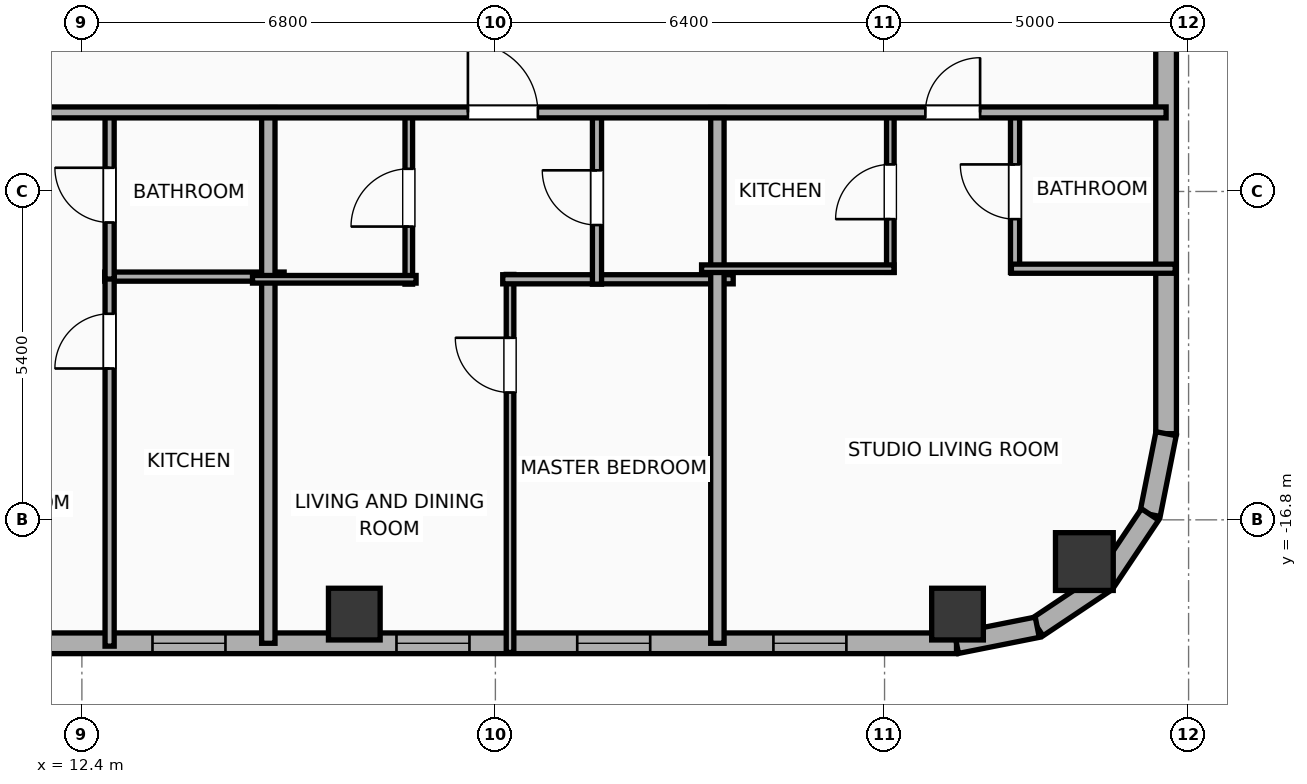
"""IFC4 building model, lengths in metres.
Left out: names, types, materials, properties, quantities, classifications, styles, units other than length and angle.
Written with IfcOpenShell. Run it as: python <this file> out.ifc"""

import sys

from ifc_helpers import new_model, si_unit, direction, frame, frame_2d, origin, origin_2d, place, context, subcontext, project, spatial, rectangle, hollow_rectangle, hollow_circle, extrude, element, fill, save


model = new_model("IFC4")
c1 = context("Model", 3, precision=1e-05, world=origin(), true_north=direction((0.0, 1.0)))
c2 = subcontext(c1, "Body", "Model", "MODEL_VIEW")
j1 = project(units=[si_unit("LENGTHUNIT", "METRE"), si_unit("PLANEANGLEUNIT", "RADIAN")], contexts=[c1])
p1 = place(None, origin())
s1 = spatial("IfcSite", under=j1, at=p1, CompositionType="ELEMENT")
p2 = place(p1, origin())
s2 = spatial("IfcBuilding", under=s1, at=p2, CompositionType="ELEMENT")
p3 = place(p2, frame((0.0, 0.0, 235.3)))
s3 = spatial("IfcBuildingStorey", under=s2, at=p3, CompositionType="ELEMENT", Elevation=235.3)
for number, where, z_axis, x_axis in (
    (1, (16.88, -18.35, 0.0), (0.0, 0.0, 1.0), (1.0, 0.0, 0.0)),
    (2, (26.8, -18.35, 0.0), (0.0, 0.0, 1.0), (1.0, 0.0, 0.0)),
):
    element("IfcColumn", number, at=place(p3, frame(where, z_axis=z_axis, x_axis=x_axis)), inside=s3, PredefinedType="COLUMN", context=c2, shape_type="SweptSolid", body=[
        extrude(hollow_rectangle(XDim=0.85, YDim=0.85, WallThickness=0.028, at=origin_2d()), origin(), (0.0, 0.0, 1.0), 3.9),
    ])
p4 = place(p3, frame((28.886, -17.486, 0.0), z_axis=(0.0, 0.0, 1.0), x_axis=(1.0, 0.0, 0.0)))
e3 = element("IfcColumn", 3, at=p4, inside=s3, PredefinedType="COLUMN", context=c2, shape_type="SweptSolid", body=[
    extrude(hollow_circle(Radius=0.475, WallThickness=0.032, at=origin_2d()), origin(), (0.0, 0.0, 1.0), 3.9),
])
p5 = place(p3, frame((26.783, -18.83, 0.0), z_axis=(0.0, 0.0, 1.0), x_axis=(-1.0, 0.0, 0.0)))
e4 = element("IfcWall", 4, at=p5, inside=s3, PredefinedType="ELEMENTEDWALL", context=c2, shape_type="SweptSolid", body=[
    extrude(rectangle(XDim=49.566, YDim=0.34, at=frame_2d((24.783, 0.0))), origin(), (0.0, 0.0, 1.0), 3.65),
])
p6 = place(p5, frame((23.583, 0.0, 0.75)))
e5 = element("IfcOpeningElement", 5, at=p6, cuts=e4, PredefinedType="OPENING", context=c2, shape_type="SweptSolid", body=[
    extrude(rectangle(XDim=2.4, YDim=2.1, at=frame_2d((1.2, 1.05))), frame((0.0, 0.18, 0.0), z_axis=(0.0, -1.0, 0.0), x_axis=(1.0, 0.0, 0.0)), (0.0, 0.0, 1.0), 0.36),
])
p7 = place(p5, frame((41.756, 0.0, 0.75)))
e6 = element("IfcOpeningElement", 6, at=p7, cuts=e4, PredefinedType="OPENING", context=c2, shape_type="SweptSolid", body=[
    extrude(rectangle(XDim=2.4, YDim=2.1, at=frame_2d((1.2, 1.05))), frame((0.0, 0.18, 0.0), z_axis=(0.0, -1.0, 0.0), x_axis=(1.0, 0.0, 0.0)), (0.0, 0.0, 1.0), 0.36),
])
p8 = place(p5, frame((47.222, 0.0, 0.75)))
e7 = element("IfcOpeningElement", 7, at=p8, cuts=e4, PredefinedType="OPENING", context=c2, shape_type="SweptSolid", body=[
    extrude(rectangle(XDim=1.2, YDim=2.05, at=frame_2d((0.6, 1.025))), frame((0.0, 0.18, 0.0), z_axis=(0.0, -1.0, 0.0), x_axis=(1.0, 0.0, 0.0)), (0.0, 0.0, 1.0), 0.36),
])
p9 = place(p5, frame((45.181, 0.0, 0.75)))
e8 = element("IfcOpeningElement", 8, at=p9, cuts=e4, PredefinedType="OPENING", context=c2, shape_type="SweptSolid", body=[
    extrude(rectangle(XDim=1.2, YDim=2.05, at=frame_2d((0.6, 1.025))), frame((0.0, 0.18, 0.0), z_axis=(0.0, -1.0, 0.0), x_axis=(1.0, 0.0, 0.0)), (0.0, 0.0, 1.0), 0.36),
])
p10 = place(p5, frame((37.289, 0.0, 0.75)))
e9 = element("IfcOpeningElement", 9, at=p10, cuts=e4, PredefinedType="OPENING", context=c2, shape_type="SweptSolid", body=[
    extrude(rectangle(XDim=1.2, YDim=2.05, at=frame_2d((0.6, 1.025))), frame((0.0, 0.18, 0.0), z_axis=(0.0, -1.0, 0.0), x_axis=(1.0, 0.0, 0.0)), (0.0, 0.0, 1.0), 0.36),
])
p11 = place(p5, frame((15.715, 0.0, 0.75)))
e10 = element("IfcOpeningElement", 10, at=p11, cuts=e4, PredefinedType="OPENING", context=c2, shape_type="SweptSolid", body=[
    extrude(rectangle(XDim=1.2, YDim=2.05, at=frame_2d((0.6, 1.025))), frame((0.0, 0.18, 0.0), z_axis=(0.0, -1.0, 0.0), x_axis=(1.0, 0.0, 0.0)), (0.0, 0.0, 1.0), 0.36),
])
p12 = place(p5, frame((12.022, 0.0, 0.75)))
e11 = element("IfcOpeningElement", 11, at=p12, cuts=e4, PredefinedType="OPENING", context=c2, shape_type="SweptSolid", body=[
    extrude(rectangle(XDim=1.2, YDim=2.05, at=frame_2d((0.6, 1.025))), frame((0.0, 0.18, 0.0), z_axis=(0.0, -1.0, 0.0), x_axis=(1.0, 0.0, 0.0)), (0.0, 0.0, 1.0), 0.36),
])
p13 = place(p5, frame((8.01, 0.0, 0.75)))
e12 = element("IfcOpeningElement", 12, at=p13, cuts=e4, PredefinedType="OPENING", context=c2, shape_type="SweptSolid", body=[
    extrude(rectangle(XDim=1.2, YDim=2.05, at=frame_2d((0.6, 1.025))), frame((0.0, 0.18, 0.0), z_axis=(0.0, -1.0, 0.0), x_axis=(1.0, 0.0, 0.0)), (0.0, 0.0, 1.0), 0.36),
])
p14 = place(p5, frame((5.037, 0.0, 0.75)))
e13 = element("IfcOpeningElement", 13, at=p14, cuts=e4, PredefinedType="OPENING", context=c2, shape_type="SweptSolid", body=[
    extrude(rectangle(XDim=1.2, YDim=2.05, at=frame_2d((0.6, 1.025))), frame((0.0, 0.18, 0.0), z_axis=(0.0, -1.0, 0.0), x_axis=(1.0, 0.0, 0.0)), (0.0, 0.0, 1.0), 0.36),
])
p15 = place(p5, frame((1.811, 0.0, 0.75)))
e14 = element("IfcOpeningElement", 14, at=p15, cuts=e4, PredefinedType="OPENING", context=c2, shape_type="SweptSolid", body=[
    extrude(rectangle(XDim=1.2, YDim=2.05, at=frame_2d((0.6, 1.025))), frame((0.0, 0.18, 0.0), z_axis=(0.0, -1.0, 0.0), x_axis=(1.0, 0.0, 0.0)), (0.0, 0.0, 1.0), 0.36),
])
p16 = place(p5, frame((32.253, 0.0, 0.75)))
e15 = element("IfcOpeningElement", 15, at=p16, cuts=e4, PredefinedType="OPENING", context=c2, shape_type="SweptSolid", body=[
    extrude(rectangle(XDim=1.2, YDim=2.05, at=frame_2d((0.6, 1.025))), frame((0.0, 0.18, 0.0), z_axis=(0.0, -1.0, 0.0), x_axis=(1.0, 0.0, 0.0)), (0.0, 0.0, 1.0), 0.36),
])
p17 = place(p5, frame((27.853, 0.0, 0.75)))
e16 = element("IfcOpeningElement", 16, at=p17, cuts=e4, PredefinedType="OPENING", context=c2, shape_type="SweptSolid", body=[
    extrude(rectangle(XDim=1.2, YDim=2.05, at=frame_2d((0.6, 1.025))), frame((0.0, 0.18, 0.0), z_axis=(0.0, -1.0, 0.0), x_axis=(1.0, 0.0, 0.0)), (0.0, 0.0, 1.0), 0.36),
])
p18 = place(p5, frame((20.473, 0.0, 0.75)))
e17 = element("IfcOpeningElement", 17, at=p18, cuts=e4, PredefinedType="OPENING", context=c2, shape_type="SweptSolid", body=[
    extrude(rectangle(XDim=1.2, YDim=2.05, at=frame_2d((0.6, 1.025))), frame((0.0, 0.18, 0.0), z_axis=(0.0, -1.0, 0.0), x_axis=(1.0, 0.0, 0.0)), (0.0, 0.0, 1.0), 0.36),
])
p19 = place(p3, frame((30.23, 16.583, 0.0), z_axis=(0.0, 0.0, 1.0), x_axis=(0.0, -1.0, 0.0)))
e18 = element("IfcWall", 18, at=p19, inside=s3, PredefinedType="ELEMENTEDWALL", context=c2, shape_type="SweptSolid", body=[
    extrude(rectangle(XDim=31.967, YDim=0.34, at=frame_2d((15.983, 0.0))), origin(), (0.0, 0.0, 1.0), 3.65),
])
p20 = place(p19, frame((11.638, 0.0, 0.75)))
e19 = element("IfcOpeningElement", 19, at=p20, cuts=e18, PredefinedType="OPENING", context=c2, shape_type="SweptSolid", body=[
    extrude(rectangle(XDim=1.2, YDim=2.05, at=frame_2d((0.6, 1.025))), frame((0.0, 0.18, 0.0), z_axis=(0.0, -1.0, 0.0), x_axis=(1.0, 0.0, 0.0)), (0.0, 0.0, 1.0), 0.36),
])
p21 = place(p19, frame((20.188, 0.0, 0.75)))
e20 = element("IfcOpeningElement", 20, at=p21, cuts=e18, PredefinedType="OPENING", context=c2, shape_type="SweptSolid", body=[
    extrude(rectangle(XDim=1.2, YDim=2.05, at=frame_2d((0.6, 1.025))), frame((0.0, 0.18, 0.0), z_axis=(0.0, -1.0, 0.0), x_axis=(1.0, 0.0, 0.0)), (0.0, 0.0, 1.0), 0.36),
])
p22 = place(p3, frame((30.23, -15.383, 0.0), z_axis=(0.0, 0.0, 1.0), x_axis=(-0.195110379894, -0.98078129043, 0.0)))
e21 = element("IfcWall", 21, at=p22, inside=s3, PredefinedType="ELEMENTEDWALL", context=c2, shape_type="SweptSolid", body=[
    extrude(rectangle(XDim=1.354, YDim=0.34, at=frame_2d((0.677, 0.0))), origin(), (0.0, 0.0, 1.0), 3.65),
])
p23 = place(p3, frame((29.966, -16.711, 0.0), z_axis=(0.0, 0.0, 1.0), x_axis=(-0.555584683399, -0.831459956686, 0.0)))
e22 = element("IfcWall", 22, at=p23, inside=s3, PredefinedType="ELEMENTEDWALL", context=c2, shape_type="SweptSolid", body=[
    extrude(rectangle(XDim=1.337, YDim=0.34, at=frame_2d((0.668, 0.0))), origin(), (0.0, 0.0, 1.0), 3.65),
])
p24 = place(p3, frame((29.223, -17.823, 0.0), z_axis=(0.0, 0.0, 1.0), x_axis=(-0.831403586725, -0.555669034571, 0.0)))
e23 = element("IfcWall", 23, at=p24, inside=s3, PredefinedType="ELEMENTEDWALL", context=c2, shape_type="SweptSolid", body=[
    extrude(rectangle(XDim=1.337, YDim=0.34, at=frame_2d((0.668, 0.0))), origin(), (0.0, 0.0, 1.0), 3.65),
])
p25 = place(p3, frame((28.111, -18.566, 0.0), z_axis=(0.0, 0.0, 1.0), x_axis=(-0.980788153188, -0.195075878998, 0.0)))
e24 = element("IfcWall", 24, at=p25, inside=s3, PredefinedType="ELEMENTEDWALL", context=c2, shape_type="SweptSolid", body=[
    extrude(rectangle(XDim=1.354, YDim=0.34, at=frame_2d((0.677, 0.0))), origin(), (0.0, 0.0, 1.0), 3.65),
])
p26 = place(p3, frame((12.776, -12.8, 0.0), z_axis=(0.0, 0.0, 1.0), x_axis=(1.0, 0.0, 0.0)))
e25 = element("IfcWall", 25, at=p26, inside=s3, PredefinedType="PLUMBINGWALL", context=c2, shape_type="SweptSolid", body=[
    extrude(rectangle(XDim=2.95, YDim=0.15, at=frame_2d((1.475, 0.0))), origin(), (0.0, 0.0, 1.0), 3.65),
])
p27 = place(p3, frame((12.856, -18.877, 0.0), z_axis=(0.0, 0.0, 1.0), x_axis=(0.0, 1.0, 0.0)))
e26 = element("IfcWall", 26, at=p27, inside=s3, PredefinedType="PLUMBINGWALL", context=c2, shape_type="SweptSolid", body=[
    extrude(rectangle(XDim=6.117, YDim=0.15, at=frame_2d((3.058, 0.0))), origin(), (0.0, 0.0, 1.0), 3.65),
])
p28 = place(p27, frame((4.566, 0.0, 0.0)))
e27 = element("IfcOpeningElement", 27, at=p28, cuts=e26, PredefinedType="OPENING", context=c2, shape_type="SweptSolid", body=[
    extrude(rectangle(XDim=0.9, YDim=2.05, at=frame_2d((0.45, 1.025))), frame((0.0, 0.085, 0.0), z_axis=(0.0, -1.0, 0.0), x_axis=(1.0, 0.0, 0.0)), (0.0, 0.0, 1.0), 0.17),
])
p29 = place(p3, frame((12.856, -12.84, 0.0), z_axis=(0.0, 0.0, 1.0), x_axis=(0.0, 1.0, 0.0)))
e28 = element("IfcWall", 28, at=p29, inside=s3, PredefinedType="PLUMBINGWALL", context=c2, shape_type="SweptSolid", body=[
    extrude(rectangle(XDim=2.76, YDim=0.15, at=frame_2d((1.38, 0.0))), origin(), (0.0, 0.0, 1.0), 3.65),
])
p30 = place(p29, frame((0.93, 0.0, 0.0)))
e29 = element("IfcOpeningElement", 29, at=p30, cuts=e28, PredefinedType="OPENING", context=c2, shape_type="SweptSolid", body=[
    extrude(rectangle(XDim=0.9, YDim=2.05, at=frame_2d((0.45, 1.025))), frame((0.0, 0.085, 0.0), z_axis=(0.0, -1.0, 0.0), x_axis=(1.0, 0.0, 0.0)), (0.0, 0.0, 1.0), 0.17),
])
p31 = place(p3, frame((15.466, -18.83, 0.0), z_axis=(0.0, 0.0, 1.0), x_axis=(0.0, 1.0, 0.0)))
e30 = element("IfcWall", 30, at=p31, inside=s3, PredefinedType="PARTITIONING", context=c2, shape_type="SweptSolid", body=[
    extrude(rectangle(XDim=8.81, YDim=0.22, at=frame_2d((4.405, 0.0))), origin(), (0.0, 0.0, 1.0), 3.65),
])
p32 = place(p3, frame((19.441, -18.98, 0.0), z_axis=(0.0, 0.0, 1.0), x_axis=(0.0, 1.0, 0.0)))
e31 = element("IfcWall", 31, at=p32, inside=s3, PredefinedType="PARTITIONING", context=c2, shape_type="SweptSolid", body=[
    extrude(rectangle(XDim=6.216, YDim=0.125, at=frame_2d((3.108, 0.0))), origin(), (0.0, 0.0, 1.0), 3.65),
])
p33 = place(p32, frame((4.274, 0.0, 0.0)))
e32 = element("IfcOpeningElement", 32, at=p33, cuts=e31, PredefinedType="OPENING", context=c2, shape_type="SweptSolid", body=[
    extrude(rectangle(XDim=0.9, YDim=2.05, at=frame_2d((0.45, 1.025))), frame((0.0, 0.073, 0.0), z_axis=(0.0, -1.0, 0.0), x_axis=(1.0, 0.0, 0.0)), (0.0, 0.0, 1.0), 0.145),
])
p34 = place(p3, frame((19.321, -12.844, 0.0), z_axis=(0.0, 0.0, 1.0), x_axis=(1.0, 0.0, 0.0)))
e33 = element("IfcWall", 33, at=p34, inside=s3, PredefinedType="PLUMBINGWALL", context=c2, shape_type="SweptSolid", body=[
    extrude(rectangle(XDim=3.79, YDim=0.15, at=frame_2d((1.895, 0.0))), origin(), (0.0, 0.0, 1.0), 3.65),
])
p35 = place(p3, frame((17.776, -12.924, 0.0), z_axis=(0.0, 0.0, 1.0), x_axis=(0.0, 1.0, 0.0)))
e34 = element("IfcWall", 34, at=p35, inside=s3, PredefinedType="PARTITIONING", context=c2, shape_type="SweptSolid", body=[
    extrude(rectangle(XDim=2.844, YDim=0.125, at=frame_2d((1.422, 0.0))), origin(), (0.0, 0.0, 1.0), 3.65),
])
p36 = place(p35, frame((0.947, 0.0, 0.0)))
e35 = element("IfcOpeningElement", 35, at=p36, cuts=e34, PredefinedType="OPENING", context=c2, shape_type="SweptSolid", body=[
    extrude(rectangle(XDim=0.95, YDim=2.05, at=frame_2d((0.475, 1.025))), frame((0.0, 0.073, 0.0), z_axis=(0.0, -1.0, 0.0), x_axis=(1.0, 0.0, 0.0)), (0.0, 0.0, 1.0), 0.145),
])
p37 = place(p3, frame((15.206, -12.844, 0.0), z_axis=(0.0, 0.0, 1.0), x_axis=(1.0, 0.0, 0.0)))
e36 = element("IfcWall", 36, at=p37, inside=s3, PredefinedType="PARTITIONING", context=c2, shape_type="SweptSolid", body=[
    extrude(rectangle(XDim=2.69, YDim=0.125, at=frame_2d((1.345, 0.0))), origin(), (0.0, 0.0, 1.0), 3.65),
])
p38 = place(p3, frame((20.871, -12.924, 0.0), z_axis=(0.0, 0.0, 1.0), x_axis=(0.0, 1.0, 0.0)))
e37 = element("IfcWall", 37, at=p38, inside=s3, PredefinedType="PLUMBINGWALL", context=c2, shape_type="SweptSolid", body=[
    extrude(rectangle(XDim=2.844, YDim=0.15, at=frame_2d((1.422, 0.0))), origin(), (0.0, 0.0, 1.0), 3.65),
])
p39 = place(p38, frame((0.972, 0.0, 0.0)))
e38 = element("IfcOpeningElement", 38, at=p39, cuts=e37, PredefinedType="OPENING", context=c2, shape_type="SweptSolid", body=[
    extrude(rectangle(XDim=0.9, YDim=2.05, at=frame_2d((0.45, 1.025))), frame((0.0, 0.085, 0.0), z_axis=(0.0, -1.0, 0.0), x_axis=(1.0, 0.0, 0.0)), (0.0, 0.0, 1.0), 0.17),
])
p40 = place(p3, frame((22.851, -18.83, 0.0), z_axis=(0.0, 0.0, 1.0), x_axis=(0.0, 1.0, 0.0)))
e39 = element("IfcWall", 39, at=p40, inside=s3, PredefinedType="PARTITIONING", context=c2, shape_type="SweptSolid", body=[
    extrude(rectangle(XDim=8.81, YDim=0.22, at=frame_2d((4.405, 0.0))), origin(), (0.0, 0.0, 1.0), 3.65),
])
p41 = place(p3, frame((25.695, -12.73, 0.0), z_axis=(0.0, 0.0, 1.0), x_axis=(0.0, 1.0, 0.0)))
e40 = element("IfcWall", 40, at=p41, inside=s3, PredefinedType="PARTITIONING", context=c2, shape_type="SweptSolid", body=[
    extrude(rectangle(XDim=2.65, YDim=0.125, at=frame_2d((1.325, 0.0))), origin(), (0.0, 0.0, 1.0), 3.65),
])
p42 = place(p41, frame((0.875, 0.0, 0.0)))
e41 = element("IfcOpeningElement", 41, at=p42, cuts=e40, PredefinedType="OPENING", context=c2, shape_type="SweptSolid", body=[
    extrude(rectangle(XDim=0.9, YDim=2.05, at=frame_2d((0.45, 1.025))), frame((0.0, 0.073, 0.0), z_axis=(0.0, -1.0, 0.0), x_axis=(1.0, 0.0, 0.0)), (0.0, 0.0, 1.0), 0.145),
])
p43 = place(p3, frame((27.746, -12.73, 0.0), z_axis=(0.0, 0.0, 1.0), x_axis=(0.0, 1.0, 0.0)))
e42 = element("IfcWall", 42, at=p43, inside=s3, PredefinedType="PLUMBINGWALL", context=c2, shape_type="SweptSolid", body=[
    extrude(rectangle(XDim=2.65, YDim=0.15, at=frame_2d((1.325, 0.0))), origin(), (0.0, 0.0, 1.0), 3.65),
])
p44 = place(p43, frame((0.875, 0.0, 0.0)))
e43 = element("IfcOpeningElement", 43, at=p44, cuts=e42, PredefinedType="OPENING", context=c2, shape_type="SweptSolid", body=[
    extrude(rectangle(XDim=0.9, YDim=2.05, at=frame_2d((0.45, 1.025))), frame((0.0, 0.085, 0.0), z_axis=(0.0, -1.0, 0.0), x_axis=(1.0, 0.0, 0.0)), (0.0, 0.0, 1.0), 0.17),
])
p45 = place(p3, frame((22.591, -12.67, 0.0), z_axis=(0.0, 0.0, 1.0), x_axis=(1.0, 0.0, 0.0)))
e44 = element("IfcWall", 44, at=p45, inside=s3, PredefinedType="PARTITIONING", context=c2, shape_type="SweptSolid", body=[
    extrude(rectangle(XDim=3.164, YDim=0.125, at=frame_2d((1.582, 0.0))), origin(), (0.0, 0.0, 1.0), 3.65),
])
p46 = place(p3, frame((27.686, -12.67, 0.0), z_axis=(0.0, 0.0, 1.0), x_axis=(1.0, 0.0, 0.0)))
e45 = element("IfcWall", 45, at=p46, inside=s3, PredefinedType="PLUMBINGWALL", context=c2, shape_type="SweptSolid", body=[
    extrude(rectangle(XDim=2.694, YDim=0.15, at=frame_2d((1.347, 0.0))), origin(), (0.0, 0.0, 1.0), 3.65),
])
p47 = place(p3, frame((8.08, -10.1, 0.0), z_axis=(0.0, 0.0, 1.0), x_axis=(1.0, 0.0, 0.0)))
e46 = element("IfcWall", 46, at=p47, inside=s3, PredefinedType="PARTITIONING", context=c2, shape_type="SweptSolid", body=[
    extrude(rectangle(XDim=22.15, YDim=0.18, at=frame_2d((11.075, 0.0))), origin(), (0.0, 0.0, 1.0), 3.65),
])
p48 = place(p47, frame((1.844, 0.0, 0.0)))
e47 = element("IfcOpeningElement", 47, at=p48, cuts=e46, PredefinedType="OPENING", context=c2, shape_type="SweptSolid", body=[
    extrude(rectangle(XDim=1.15, YDim=2.05, at=frame_2d((0.575, 1.025))), frame((0.0, 0.1, 0.0), z_axis=(0.0, -1.0, 0.0), x_axis=(1.0, 0.0, 0.0)), (0.0, 0.0, 1.0), 0.2),
])
p49 = place(p47, frame((10.668, 0.0, 0.0)))
e48 = element("IfcOpeningElement", 48, at=p49, cuts=e46, PredefinedType="OPENING", context=c2, shape_type="SweptSolid", body=[
    extrude(rectangle(XDim=1.15, YDim=2.05, at=frame_2d((0.575, 1.025))), frame((0.0, 0.1, 0.0), z_axis=(0.0, -1.0, 0.0), x_axis=(1.0, 0.0, 0.0)), (0.0, 0.0, 1.0), 0.2),
])
p50 = place(p47, frame((18.191, 0.0, 0.0)))
e49 = element("IfcOpeningElement", 49, at=p50, cuts=e46, PredefinedType="OPENING", context=c2, shape_type="SweptSolid", body=[
    extrude(rectangle(XDim=0.9, YDim=2.05, at=frame_2d((0.45, 1.025))), frame((0.0, 0.1, 0.0), z_axis=(0.0, -1.0, 0.0), x_axis=(1.0, 0.0, 0.0)), (0.0, 0.0, 1.0), 0.2),
])
p51 = place(p12, origin())
e50 = element("IfcWindow", 50, at=p51, inside=s3, PartitioningType="SINGLE_PANEL", PredefinedType="WINDOW", context=c2, shape_type="SweptSolid", body=[
    extrude(rectangle(XDim=1.2, YDim=2.05, at=frame_2d((0.6, 1.025))), frame((0.0, 0.03, 0.0), z_axis=(0.0, -1.0, 0.0), x_axis=(1.0, 0.0, 0.0)), (0.0, 0.0, 1.0), 0.06),
])
fill(e11, e50)
p52 = place(p13, origin())
e51 = element("IfcWindow", 51, at=p52, inside=s3, PartitioningType="SINGLE_PANEL", PredefinedType="WINDOW", context=c2, shape_type="SweptSolid", body=[
    extrude(rectangle(XDim=1.2, YDim=2.05, at=frame_2d((0.6, 1.025))), frame((0.0, 0.03, 0.0), z_axis=(0.0, -1.0, 0.0), x_axis=(1.0, 0.0, 0.0)), (0.0, 0.0, 1.0), 0.06),
])
fill(e12, e51)
p53 = place(p14, origin())
e52 = element("IfcWindow", 52, at=p53, inside=s3, PartitioningType="SINGLE_PANEL", PredefinedType="WINDOW", context=c2, shape_type="SweptSolid", body=[
    extrude(rectangle(XDim=1.2, YDim=2.05, at=frame_2d((0.6, 1.025))), frame((0.0, 0.03, 0.0), z_axis=(0.0, -1.0, 0.0), x_axis=(1.0, 0.0, 0.0)), (0.0, 0.0, 1.0), 0.06),
])
fill(e13, e52)
p54 = place(p15, origin())
e53 = element("IfcWindow", 53, at=p54, inside=s3, PartitioningType="SINGLE_PANEL", PredefinedType="WINDOW", context=c2, shape_type="SweptSolid", body=[
    extrude(rectangle(XDim=1.2, YDim=2.05, at=frame_2d((0.6, 1.025))), frame((0.0, 0.03, 0.0), z_axis=(0.0, -1.0, 0.0), x_axis=(1.0, 0.0, 0.0)), (0.0, 0.0, 1.0), 0.06),
])
fill(e14, e53)
p55 = place(p28, origin())
e54 = element("IfcDoor", 54, at=p55, inside=s3, OperationType="SINGLE_SWING_LEFT", PredefinedType="DOOR", context=c2, shape_type="SweptSolid", body=[
    extrude(rectangle(XDim=0.9, YDim=2.05, at=frame_2d((0.45, 1.025))), frame((0.0, 0.025, 0.0), z_axis=(0.0, -1.0, 0.0), x_axis=(1.0, 0.0, 0.0)), (0.0, 0.0, 1.0), 0.05),
])
fill(e27, e54)
p56 = place(p30, origin())
e55 = element("IfcDoor", 55, at=p56, inside=s3, OperationType="SINGLE_SWING_RIGHT", PredefinedType="DOOR", context=c2, shape_type="SweptSolid", body=[
    extrude(rectangle(XDim=0.9, YDim=2.05, at=frame_2d((0.45, 1.025))), frame((0.0, 0.025, 0.0), z_axis=(0.0, -1.0, 0.0), x_axis=(1.0, 0.0, 0.0)), (0.0, 0.0, 1.0), 0.05),
])
fill(e29, e55)
p57 = place(p33, origin())
e56 = element("IfcDoor", 56, at=p57, inside=s3, OperationType="SINGLE_SWING_RIGHT", PredefinedType="DOOR", context=c2, shape_type="SweptSolid", body=[
    extrude(rectangle(XDim=0.9, YDim=2.05, at=frame_2d((0.45, 1.025))), frame((0.0, 0.025, 0.0), z_axis=(0.0, -1.0, 0.0), x_axis=(1.0, 0.0, 0.0)), (0.0, 0.0, 1.0), 0.05),
])
fill(e32, e56)
p58 = place(p36, origin())
e57 = element("IfcDoor", 57, at=p58, inside=s3, OperationType="SINGLE_SWING_LEFT", PredefinedType="DOOR", context=c2, shape_type="SweptSolid", body=[
    extrude(rectangle(XDim=0.95, YDim=2.05, at=frame_2d((0.475, 1.025))), frame((0.0, 0.025, 0.0), z_axis=(0.0, -1.0, 0.0), x_axis=(1.0, 0.0, 0.0)), (0.0, 0.0, 1.0), 0.05),
])
fill(e35, e57)
p59 = place(p39, origin())
e58 = element("IfcDoor", 58, at=p59, inside=s3, OperationType="SINGLE_SWING_RIGHT", PredefinedType="DOOR", context=c2, shape_type="SweptSolid", body=[
    extrude(rectangle(XDim=0.9, YDim=2.05, at=frame_2d((0.45, 1.025))), frame((0.0, 0.025, 0.0), z_axis=(0.0, -1.0, 0.0), x_axis=(1.0, 0.0, 0.0)), (0.0, 0.0, 1.0), 0.05),
])
fill(e38, e58)
p60 = place(p42, origin())
e59 = element("IfcDoor", 59, at=p60, inside=s3, OperationType="SINGLE_SWING_LEFT", PredefinedType="DOOR", context=c2, shape_type="SweptSolid", body=[
    extrude(rectangle(XDim=0.9, YDim=2.05, at=frame_2d((0.45, 1.025))), frame((0.0, 0.025, 0.0), z_axis=(0.0, -1.0, 0.0), x_axis=(1.0, 0.0, 0.0)), (0.0, 0.0, 1.0), 0.05),
])
fill(e41, e59)
p61 = place(p44, origin())
e60 = element("IfcDoor", 60, at=p61, inside=s3, OperationType="SINGLE_SWING_RIGHT", PredefinedType="DOOR", context=c2, shape_type="SweptSolid", body=[
    extrude(rectangle(XDim=0.9, YDim=2.05, at=frame_2d((0.45, 1.025))), frame((0.0, 0.025, 0.0), z_axis=(0.0, -1.0, 0.0), x_axis=(1.0, 0.0, 0.0)), (0.0, 0.0, 1.0), 0.05),
])
fill(e43, e60)
p62 = place(p49, origin())
e61 = element("IfcDoor", 61, at=p62, inside=s3, OperationType="SINGLE_SWING_LEFT", PredefinedType="DOOR", context=c2, shape_type="SweptSolid", body=[
    extrude(rectangle(XDim=1.15, YDim=2.05, at=frame_2d((0.575, 1.025))), frame((0.0, 0.025, 0.0), z_axis=(0.0, -1.0, 0.0), x_axis=(1.0, 0.0, 0.0)), (0.0, 0.0, 1.0), 0.05),
])
fill(e48, e61)
p63 = place(p50, origin())
e62 = element("IfcDoor", 62, at=p63, inside=s3, OperationType="SINGLE_SWING_RIGHT", PredefinedType="DOOR", context=c2, shape_type="SweptSolid", body=[
    extrude(rectangle(XDim=0.9, YDim=2.05, at=frame_2d((0.45, 1.025))), frame((0.0, 0.025, 0.0), z_axis=(0.0, -1.0, 0.0), x_axis=(1.0, 0.0, 0.0)), (0.0, 0.0, 1.0), 0.05),
])
fill(e49, e62)
save(model, sys.argv[1])
